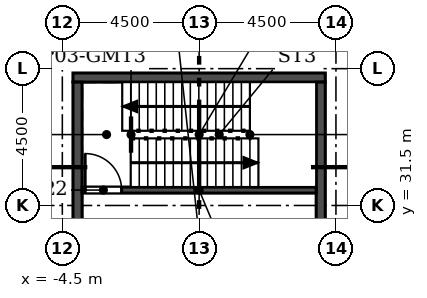
"""IFC4 building model, lengths in metres.
Left out: names, types, materials, properties, quantities, classifications, styles, units other than length and angle.
Written with IfcOpenShell. Run it as: python <this file> out.ifc"""

import sys

from ifc_helpers import new_model, si_unit, direction, frame, frame_2d, origin, place, context, subcontext, project, spatial, rectangle, extrude, element, fill, save


model = new_model("IFC4")
c1 = context("Model", 3, precision=1e-05, world=origin(), true_north=direction((0.0, 1.0)))
c2 = subcontext(c1, "Body", "Model", "MODEL_VIEW")
j1 = project(units=[si_unit("LENGTHUNIT", "METRE"), si_unit("PLANEANGLEUNIT", "RADIAN")], contexts=[c1])
p1 = place(None, origin())
s1 = spatial("IfcSite", under=j1, at=p1, CompositionType="ELEMENT")
p2 = place(p1, origin())
s2 = spatial("IfcBuilding", under=s1, at=p2, CompositionType="ELEMENT")
p3 = place(p2, frame((0.0, 0.0, 20.0)))
s3 = spatial("IfcBuildingStorey", under=s2, at=p3, CompositionType="ELEMENT", Elevation=20.0)
p4 = place(p3, frame((42.853, 8.575, 0.0), z_axis=(0.0, 0.0, 1.0), x_axis=(-0.49999894854, 0.866026010844, 0.0)))
e1 = element("IfcWall", 1, at=p4, inside=s3, PredefinedType="SOLIDWALL", context=c2, shape_type="SweptSolid", body=[
    extrude(rectangle(XDim=76.0, YDim=0.34, at=frame_2d((38.0, 0.0))), origin(), (0.0, 0.0, 1.0), 3.0),
])
p5 = place(p4, frame((1.058, 0.0, 0.9)))
e2 = element("IfcOpeningElement", 2, at=p5, cuts=e1, PredefinedType="OPENING", context=c2, shape_type="SweptSolid", body=[
    extrude(rectangle(XDim=1.885, YDim=1.9, at=frame_2d((0.942, 0.95))), frame((0.0, 0.18, 0.0), z_axis=(0.0, -1.0, 0.0), x_axis=(1.0, 0.0, 0.0)), (0.0, 0.0, 1.0), 0.36),
])
p6 = place(p4, frame((4.058, 0.0, 0.9)))
e3 = element("IfcOpeningElement", 3, at=p6, cuts=e1, PredefinedType="OPENING", context=c2, shape_type="SweptSolid", body=[
    extrude(rectangle(XDim=1.885, YDim=1.9, at=frame_2d((0.942, 0.95))), frame((0.0, 0.18, 0.0), z_axis=(0.0, -1.0, 0.0), x_axis=(1.0, 0.0, 0.0)), (0.0, 0.0, 1.0), 0.36),
])
p7 = place(p4, frame((7.058, 0.0, 0.9)))
e4 = element("IfcOpeningElement", 4, at=p7, cuts=e1, PredefinedType="OPENING", context=c2, shape_type="SweptSolid", body=[
    extrude(rectangle(XDim=1.885, YDim=1.9, at=frame_2d((0.942, 0.95))), frame((0.0, 0.18, 0.0), z_axis=(0.0, -1.0, 0.0), x_axis=(1.0, 0.0, 0.0)), (0.0, 0.0, 1.0), 0.36),
])
p8 = place(p4, frame((10.058, 0.0, 0.9)))
e5 = element("IfcOpeningElement", 5, at=p8, cuts=e1, PredefinedType="OPENING", context=c2, shape_type="SweptSolid", body=[
    extrude(rectangle(XDim=1.885, YDim=1.9, at=frame_2d((0.942, 0.95))), frame((0.0, 0.18, 0.0), z_axis=(0.0, -1.0, 0.0), x_axis=(1.0, 0.0, 0.0)), (0.0, 0.0, 1.0), 0.36),
])
p9 = place(p4, frame((13.058, 0.0, 0.9)))
e6 = element("IfcOpeningElement", 6, at=p9, cuts=e1, PredefinedType="OPENING", context=c2, shape_type="SweptSolid", body=[
    extrude(rectangle(XDim=1.885, YDim=1.9, at=frame_2d((0.942, 0.95))), frame((0.0, 0.18, 0.0), z_axis=(0.0, -1.0, 0.0), x_axis=(1.0, 0.0, 0.0)), (0.0, 0.0, 1.0), 0.36),
])
p10 = place(p4, frame((16.058, 0.0, 0.9)))
e7 = element("IfcOpeningElement", 7, at=p10, cuts=e1, PredefinedType="OPENING", context=c2, shape_type="SweptSolid", body=[
    extrude(rectangle(XDim=1.885, YDim=1.9, at=frame_2d((0.942, 0.95))), frame((0.0, 0.18, 0.0), z_axis=(0.0, -1.0, 0.0), x_axis=(1.0, 0.0, 0.0)), (0.0, 0.0, 1.0), 0.36),
])
p11 = place(p4, frame((19.058, 0.0, 0.9)))
e8 = element("IfcOpeningElement", 8, at=p11, cuts=e1, PredefinedType="OPENING", context=c2, shape_type="SweptSolid", body=[
    extrude(rectangle(XDim=1.885, YDim=1.9, at=frame_2d((0.942, 0.95))), frame((0.0, 0.18, 0.0), z_axis=(0.0, -1.0, 0.0), x_axis=(1.0, 0.0, 0.0)), (0.0, 0.0, 1.0), 0.36),
])
p12 = place(p4, frame((22.058, 0.0, 0.9)))
e9 = element("IfcOpeningElement", 9, at=p12, cuts=e1, PredefinedType="OPENING", context=c2, shape_type="SweptSolid", body=[
    extrude(rectangle(XDim=1.885, YDim=1.9, at=frame_2d((0.942, 0.95))), frame((0.0, 0.18, 0.0), z_axis=(0.0, -1.0, 0.0), x_axis=(1.0, 0.0, 0.0)), (0.0, 0.0, 1.0), 0.36),
])
p13 = place(p4, frame((25.058, 0.0, 0.9)))
e10 = element("IfcOpeningElement", 10, at=p13, cuts=e1, PredefinedType="OPENING", context=c2, shape_type="SweptSolid", body=[
    extrude(rectangle(XDim=1.885, YDim=1.9, at=frame_2d((0.942, 0.95))), frame((0.0, 0.18, 0.0), z_axis=(0.0, -1.0, 0.0), x_axis=(1.0, 0.0, 0.0)), (0.0, 0.0, 1.0), 0.36),
])
p14 = place(p4, frame((28.058, 0.0, 0.9)))
e11 = element("IfcOpeningElement", 11, at=p14, cuts=e1, PredefinedType="OPENING", context=c2, shape_type="SweptSolid", body=[
    extrude(rectangle(XDim=1.885, YDim=1.9, at=frame_2d((0.942, 0.95))), frame((0.0, 0.18, 0.0), z_axis=(0.0, -1.0, 0.0), x_axis=(1.0, 0.0, 0.0)), (0.0, 0.0, 1.0), 0.36),
])
p15 = place(p4, frame((31.058, 0.0, 0.9)))
e12 = element("IfcOpeningElement", 12, at=p15, cuts=e1, PredefinedType="OPENING", context=c2, shape_type="SweptSolid", body=[
    extrude(rectangle(XDim=1.885, YDim=1.9, at=frame_2d((0.942, 0.95))), frame((0.0, 0.18, 0.0), z_axis=(0.0, -1.0, 0.0), x_axis=(1.0, 0.0, 0.0)), (0.0, 0.0, 1.0), 0.36),
])
p16 = place(p4, frame((34.058, 0.0, 0.9)))
e13 = element("IfcOpeningElement", 13, at=p16, cuts=e1, PredefinedType="OPENING", context=c2, shape_type="SweptSolid", body=[
    extrude(rectangle(XDim=1.885, YDim=1.9, at=frame_2d((0.942, 0.95))), frame((0.0, 0.18, 0.0), z_axis=(0.0, -1.0, 0.0), x_axis=(1.0, 0.0, 0.0)), (0.0, 0.0, 1.0), 0.36),
])
p17 = place(p4, frame((37.058, 0.0, 0.9)))
e14 = element("IfcOpeningElement", 14, at=p17, cuts=e1, PredefinedType="OPENING", context=c2, shape_type="SweptSolid", body=[
    extrude(rectangle(XDim=1.885, YDim=1.9, at=frame_2d((0.942, 0.95))), frame((0.0, 0.18, 0.0), z_axis=(0.0, -1.0, 0.0), x_axis=(1.0, 0.0, 0.0)), (0.0, 0.0, 1.0), 0.36),
])
p18 = place(p4, frame((40.058, 0.0, 0.9)))
e15 = element("IfcOpeningElement", 15, at=p18, cuts=e1, PredefinedType="OPENING", context=c2, shape_type="SweptSolid", body=[
    extrude(rectangle(XDim=1.885, YDim=1.9, at=frame_2d((0.942, 0.95))), frame((0.0, 0.18, 0.0), z_axis=(0.0, -1.0, 0.0), x_axis=(1.0, 0.0, 0.0)), (0.0, 0.0, 1.0), 0.36),
])
p19 = place(p4, frame((43.058, 0.0, 0.9)))
e16 = element("IfcOpeningElement", 16, at=p19, cuts=e1, PredefinedType="OPENING", context=c2, shape_type="SweptSolid", body=[
    extrude(rectangle(XDim=1.885, YDim=1.9, at=frame_2d((0.942, 0.95))), frame((0.0, 0.18, 0.0), z_axis=(0.0, -1.0, 0.0), x_axis=(1.0, 0.0, 0.0)), (0.0, 0.0, 1.0), 0.36),
])
p20 = place(p4, frame((46.058, 0.0, 0.9)))
e17 = element("IfcOpeningElement", 17, at=p20, cuts=e1, PredefinedType="OPENING", context=c2, shape_type="SweptSolid", body=[
    extrude(rectangle(XDim=1.885, YDim=1.9, at=frame_2d((0.942, 0.95))), frame((0.0, 0.18, 0.0), z_axis=(0.0, -1.0, 0.0), x_axis=(1.0, 0.0, 0.0)), (0.0, 0.0, 1.0), 0.36),
])
p21 = place(p4, frame((49.058, 0.0, 0.9)))
e18 = element("IfcOpeningElement", 18, at=p21, cuts=e1, PredefinedType="OPENING", context=c2, shape_type="SweptSolid", body=[
    extrude(rectangle(XDim=1.885, YDim=1.9, at=frame_2d((0.942, 0.95))), frame((0.0, 0.18, 0.0), z_axis=(0.0, -1.0, 0.0), x_axis=(1.0, 0.0, 0.0)), (0.0, 0.0, 1.0), 0.36),
])
p22 = place(p4, frame((52.058, 0.0, 0.9)))
e19 = element("IfcOpeningElement", 19, at=p22, cuts=e1, PredefinedType="OPENING", context=c2, shape_type="SweptSolid", body=[
    extrude(rectangle(XDim=1.885, YDim=1.9, at=frame_2d((0.942, 0.95))), frame((0.0, 0.18, 0.0), z_axis=(0.0, -1.0, 0.0), x_axis=(1.0, 0.0, 0.0)), (0.0, 0.0, 1.0), 0.36),
])
p23 = place(p4, frame((55.058, 0.0, 0.9)))
e20 = element("IfcOpeningElement", 20, at=p23, cuts=e1, PredefinedType="OPENING", context=c2, shape_type="SweptSolid", body=[
    extrude(rectangle(XDim=1.885, YDim=1.9, at=frame_2d((0.942, 0.95))), frame((0.0, 0.18, 0.0), z_axis=(0.0, -1.0, 0.0), x_axis=(1.0, 0.0, 0.0)), (0.0, 0.0, 1.0), 0.36),
])
p24 = place(p4, frame((58.058, 0.0, 0.9)))
e21 = element("IfcOpeningElement", 21, at=p24, cuts=e1, PredefinedType="OPENING", context=c2, shape_type="SweptSolid", body=[
    extrude(rectangle(XDim=1.885, YDim=1.9, at=frame_2d((0.942, 0.95))), frame((0.0, 0.18, 0.0), z_axis=(0.0, -1.0, 0.0), x_axis=(1.0, 0.0, 0.0)), (0.0, 0.0, 1.0), 0.36),
])
p25 = place(p4, frame((61.058, 0.0, 0.9)))
e22 = element("IfcOpeningElement", 22, at=p25, cuts=e1, PredefinedType="OPENING", context=c2, shape_type="SweptSolid", body=[
    extrude(rectangle(XDim=1.885, YDim=1.9, at=frame_2d((0.942, 0.95))), frame((0.0, 0.18, 0.0), z_axis=(0.0, -1.0, 0.0), x_axis=(1.0, 0.0, 0.0)), (0.0, 0.0, 1.0), 0.36),
])
p26 = place(p4, frame((64.058, 0.0, 0.9)))
e23 = element("IfcOpeningElement", 23, at=p26, cuts=e1, PredefinedType="OPENING", context=c2, shape_type="SweptSolid", body=[
    extrude(rectangle(XDim=1.885, YDim=1.9, at=frame_2d((0.942, 0.95))), frame((0.0, 0.18, 0.0), z_axis=(0.0, -1.0, 0.0), x_axis=(1.0, 0.0, 0.0)), (0.0, 0.0, 1.0), 0.36),
])
p27 = place(p4, frame((67.058, 0.0, 0.9)))
e24 = element("IfcOpeningElement", 24, at=p27, cuts=e1, PredefinedType="OPENING", context=c2, shape_type="SweptSolid", body=[
    extrude(rectangle(XDim=1.885, YDim=1.9, at=frame_2d((0.942, 0.95))), frame((0.0, 0.18, 0.0), z_axis=(0.0, -1.0, 0.0), x_axis=(1.0, 0.0, 0.0)), (0.0, 0.0, 1.0), 0.36),
])
p28 = place(p4, frame((70.058, 0.0, 0.9)))
e25 = element("IfcOpeningElement", 25, at=p28, cuts=e1, PredefinedType="OPENING", context=c2, shape_type="SweptSolid", body=[
    extrude(rectangle(XDim=1.885, YDim=1.9, at=frame_2d((0.942, 0.95))), frame((0.0, 0.18, 0.0), z_axis=(0.0, -1.0, 0.0), x_axis=(1.0, 0.0, 0.0)), (0.0, 0.0, 1.0), 0.36),
])
p29 = place(p4, frame((73.058, 0.0, 0.9)))
e26 = element("IfcOpeningElement", 26, at=p29, cuts=e1, PredefinedType="OPENING", context=c2, shape_type="SweptSolid", body=[
    extrude(rectangle(XDim=1.885, YDim=1.9, at=frame_2d((0.942, 0.95))), frame((0.0, 0.18, 0.0), z_axis=(0.0, -1.0, 0.0), x_axis=(1.0, 0.0, 0.0)), (0.0, 0.0, 1.0), 0.36),
])
p30 = place(p3, frame((-4.853, 74.393, 0.0), z_axis=(0.0, 0.0, 1.0), x_axis=(-0.49999894854, -0.866026010844, 0.0)))
e27 = element("IfcWall", 27, at=p30, inside=s3, PredefinedType="SOLIDWALL", context=c2, shape_type="SweptSolid", body=[
    extrude(rectangle(XDim=76.0, YDim=0.34, at=frame_2d((38.0, 0.0))), origin(), (0.0, 0.0, 1.0), 3.0),
])
p31 = place(p30, frame((1.058, 0.0, 0.9)))
e28 = element("IfcOpeningElement", 28, at=p31, cuts=e27, PredefinedType="OPENING", context=c2, shape_type="SweptSolid", body=[
    extrude(rectangle(XDim=1.885, YDim=1.9, at=frame_2d((0.942, 0.95))), frame((0.0, 0.18, 0.0), z_axis=(0.0, -1.0, 0.0), x_axis=(1.0, 0.0, 0.0)), (0.0, 0.0, 1.0), 0.36),
])
p32 = place(p30, frame((4.058, 0.0, 0.9)))
e29 = element("IfcOpeningElement", 29, at=p32, cuts=e27, PredefinedType="OPENING", context=c2, shape_type="SweptSolid", body=[
    extrude(rectangle(XDim=1.885, YDim=1.9, at=frame_2d((0.942, 0.95))), frame((0.0, 0.18, 0.0), z_axis=(0.0, -1.0, 0.0), x_axis=(1.0, 0.0, 0.0)), (0.0, 0.0, 1.0), 0.36),
])
p33 = place(p30, frame((7.058, 0.0, 0.9)))
e30 = element("IfcOpeningElement", 30, at=p33, cuts=e27, PredefinedType="OPENING", context=c2, shape_type="SweptSolid", body=[
    extrude(rectangle(XDim=1.885, YDim=1.9, at=frame_2d((0.942, 0.95))), frame((0.0, 0.18, 0.0), z_axis=(0.0, -1.0, 0.0), x_axis=(1.0, 0.0, 0.0)), (0.0, 0.0, 1.0), 0.36),
])
p34 = place(p30, frame((10.058, 0.0, 0.9)))
e31 = element("IfcOpeningElement", 31, at=p34, cuts=e27, PredefinedType="OPENING", context=c2, shape_type="SweptSolid", body=[
    extrude(rectangle(XDim=1.885, YDim=1.9, at=frame_2d((0.942, 0.95))), frame((0.0, 0.18, 0.0), z_axis=(0.0, -1.0, 0.0), x_axis=(1.0, 0.0, 0.0)), (0.0, 0.0, 1.0), 0.36),
])
p35 = place(p30, frame((13.058, 0.0, 0.9)))
e32 = element("IfcOpeningElement", 32, at=p35, cuts=e27, PredefinedType="OPENING", context=c2, shape_type="SweptSolid", body=[
    extrude(rectangle(XDim=1.885, YDim=1.9, at=frame_2d((0.942, 0.95))), frame((0.0, 0.18, 0.0), z_axis=(0.0, -1.0, 0.0), x_axis=(1.0, 0.0, 0.0)), (0.0, 0.0, 1.0), 0.36),
])
p36 = place(p30, frame((16.058, 0.0, 0.9)))
e33 = element("IfcOpeningElement", 33, at=p36, cuts=e27, PredefinedType="OPENING", context=c2, shape_type="SweptSolid", body=[
    extrude(rectangle(XDim=1.885, YDim=1.9, at=frame_2d((0.942, 0.95))), frame((0.0, 0.18, 0.0), z_axis=(0.0, -1.0, 0.0), x_axis=(1.0, 0.0, 0.0)), (0.0, 0.0, 1.0), 0.36),
])
p37 = place(p30, frame((19.058, 0.0, 0.9)))
e34 = element("IfcOpeningElement", 34, at=p37, cuts=e27, PredefinedType="OPENING", context=c2, shape_type="SweptSolid", body=[
    extrude(rectangle(XDim=1.885, YDim=1.9, at=frame_2d((0.942, 0.95))), frame((0.0, 0.18, 0.0), z_axis=(0.0, -1.0, 0.0), x_axis=(1.0, 0.0, 0.0)), (0.0, 0.0, 1.0), 0.36),
])
p38 = place(p30, frame((22.058, 0.0, 0.9)))
e35 = element("IfcOpeningElement", 35, at=p38, cuts=e27, PredefinedType="OPENING", context=c2, shape_type="SweptSolid", body=[
    extrude(rectangle(XDim=1.885, YDim=1.9, at=frame_2d((0.942, 0.95))), frame((0.0, 0.18, 0.0), z_axis=(0.0, -1.0, 0.0), x_axis=(1.0, 0.0, 0.0)), (0.0, 0.0, 1.0), 0.36),
])
p39 = place(p30, frame((25.058, 0.0, 0.9)))
e36 = element("IfcOpeningElement", 36, at=p39, cuts=e27, PredefinedType="OPENING", context=c2, shape_type="SweptSolid", body=[
    extrude(rectangle(XDim=1.885, YDim=1.9, at=frame_2d((0.942, 0.95))), frame((0.0, 0.18, 0.0), z_axis=(0.0, -1.0, 0.0), x_axis=(1.0, 0.0, 0.0)), (0.0, 0.0, 1.0), 0.36),
])
p40 = place(p30, frame((28.058, 0.0, 0.9)))
e37 = element("IfcOpeningElement", 37, at=p40, cuts=e27, PredefinedType="OPENING", context=c2, shape_type="SweptSolid", body=[
    extrude(rectangle(XDim=1.885, YDim=1.9, at=frame_2d((0.942, 0.95))), frame((0.0, 0.18, 0.0), z_axis=(0.0, -1.0, 0.0), x_axis=(1.0, 0.0, 0.0)), (0.0, 0.0, 1.0), 0.36),
])
p41 = place(p30, frame((31.058, 0.0, 0.9)))
e38 = element("IfcOpeningElement", 38, at=p41, cuts=e27, PredefinedType="OPENING", context=c2, shape_type="SweptSolid", body=[
    extrude(rectangle(XDim=1.885, YDim=1.9, at=frame_2d((0.942, 0.95))), frame((0.0, 0.18, 0.0), z_axis=(0.0, -1.0, 0.0), x_axis=(1.0, 0.0, 0.0)), (0.0, 0.0, 1.0), 0.36),
])
p42 = place(p30, frame((34.058, 0.0, 0.9)))
e39 = element("IfcOpeningElement", 39, at=p42, cuts=e27, PredefinedType="OPENING", context=c2, shape_type="SweptSolid", body=[
    extrude(rectangle(XDim=1.885, YDim=1.9, at=frame_2d((0.942, 0.95))), frame((0.0, 0.18, 0.0), z_axis=(0.0, -1.0, 0.0), x_axis=(1.0, 0.0, 0.0)), (0.0, 0.0, 1.0), 0.36),
])
p43 = place(p30, frame((37.058, 0.0, 0.9)))
e40 = element("IfcOpeningElement", 40, at=p43, cuts=e27, PredefinedType="OPENING", context=c2, shape_type="SweptSolid", body=[
    extrude(rectangle(XDim=1.885, YDim=1.9, at=frame_2d((0.942, 0.95))), frame((0.0, 0.18, 0.0), z_axis=(0.0, -1.0, 0.0), x_axis=(1.0, 0.0, 0.0)), (0.0, 0.0, 1.0), 0.36),
])
p44 = place(p30, frame((40.058, 0.0, 0.9)))
e41 = element("IfcOpeningElement", 41, at=p44, cuts=e27, PredefinedType="OPENING", context=c2, shape_type="SweptSolid", body=[
    extrude(rectangle(XDim=1.885, YDim=1.9, at=frame_2d((0.942, 0.95))), frame((0.0, 0.18, 0.0), z_axis=(0.0, -1.0, 0.0), x_axis=(1.0, 0.0, 0.0)), (0.0, 0.0, 1.0), 0.36),
])
p45 = place(p30, frame((43.058, 0.0, 0.9)))
e42 = element("IfcOpeningElement", 42, at=p45, cuts=e27, PredefinedType="OPENING", context=c2, shape_type="SweptSolid", body=[
    extrude(rectangle(XDim=1.885, YDim=1.9, at=frame_2d((0.942, 0.95))), frame((0.0, 0.18, 0.0), z_axis=(0.0, -1.0, 0.0), x_axis=(1.0, 0.0, 0.0)), (0.0, 0.0, 1.0), 0.36),
])
p46 = place(p30, frame((46.058, 0.0, 0.9)))
e43 = element("IfcOpeningElement", 43, at=p46, cuts=e27, PredefinedType="OPENING", context=c2, shape_type="SweptSolid", body=[
    extrude(rectangle(XDim=1.885, YDim=1.9, at=frame_2d((0.942, 0.95))), frame((0.0, 0.18, 0.0), z_axis=(0.0, -1.0, 0.0), x_axis=(1.0, 0.0, 0.0)), (0.0, 0.0, 1.0), 0.36),
])
p47 = place(p30, frame((49.058, 0.0, 0.9)))
e44 = element("IfcOpeningElement", 44, at=p47, cuts=e27, PredefinedType="OPENING", context=c2, shape_type="SweptSolid", body=[
    extrude(rectangle(XDim=1.885, YDim=1.9, at=frame_2d((0.942, 0.95))), frame((0.0, 0.18, 0.0), z_axis=(0.0, -1.0, 0.0), x_axis=(1.0, 0.0, 0.0)), (0.0, 0.0, 1.0), 0.36),
])
p48 = place(p30, frame((52.058, 0.0, 0.9)))
e45 = element("IfcOpeningElement", 45, at=p48, cuts=e27, PredefinedType="OPENING", context=c2, shape_type="SweptSolid", body=[
    extrude(rectangle(XDim=1.885, YDim=1.9, at=frame_2d((0.942, 0.95))), frame((0.0, 0.18, 0.0), z_axis=(0.0, -1.0, 0.0), x_axis=(1.0, 0.0, 0.0)), (0.0, 0.0, 1.0), 0.36),
])
p49 = place(p30, frame((55.058, 0.0, 0.9)))
e46 = element("IfcOpeningElement", 46, at=p49, cuts=e27, PredefinedType="OPENING", context=c2, shape_type="SweptSolid", body=[
    extrude(rectangle(XDim=1.885, YDim=1.9, at=frame_2d((0.942, 0.95))), frame((0.0, 0.18, 0.0), z_axis=(0.0, -1.0, 0.0), x_axis=(1.0, 0.0, 0.0)), (0.0, 0.0, 1.0), 0.36),
])
p50 = place(p30, frame((58.058, 0.0, 0.9)))
e47 = element("IfcOpeningElement", 47, at=p50, cuts=e27, PredefinedType="OPENING", context=c2, shape_type="SweptSolid", body=[
    extrude(rectangle(XDim=1.885, YDim=1.9, at=frame_2d((0.942, 0.95))), frame((0.0, 0.18, 0.0), z_axis=(0.0, -1.0, 0.0), x_axis=(1.0, 0.0, 0.0)), (0.0, 0.0, 1.0), 0.36),
])
p51 = place(p30, frame((61.058, 0.0, 0.9)))
e48 = element("IfcOpeningElement", 48, at=p51, cuts=e27, PredefinedType="OPENING", context=c2, shape_type="SweptSolid", body=[
    extrude(rectangle(XDim=1.885, YDim=1.9, at=frame_2d((0.942, 0.95))), frame((0.0, 0.18, 0.0), z_axis=(0.0, -1.0, 0.0), x_axis=(1.0, 0.0, 0.0)), (0.0, 0.0, 1.0), 0.36),
])
p52 = place(p30, frame((64.058, 0.0, 0.9)))
e49 = element("IfcOpeningElement", 49, at=p52, cuts=e27, PredefinedType="OPENING", context=c2, shape_type="SweptSolid", body=[
    extrude(rectangle(XDim=1.885, YDim=1.9, at=frame_2d((0.942, 0.95))), frame((0.0, 0.18, 0.0), z_axis=(0.0, -1.0, 0.0), x_axis=(1.0, 0.0, 0.0)), (0.0, 0.0, 1.0), 0.36),
])
p53 = place(p30, frame((67.058, 0.0, 0.9)))
e50 = element("IfcOpeningElement", 50, at=p53, cuts=e27, PredefinedType="OPENING", context=c2, shape_type="SweptSolid", body=[
    extrude(rectangle(XDim=1.885, YDim=1.9, at=frame_2d((0.942, 0.95))), frame((0.0, 0.18, 0.0), z_axis=(0.0, -1.0, 0.0), x_axis=(1.0, 0.0, 0.0)), (0.0, 0.0, 1.0), 0.36),
])
p54 = place(p30, frame((70.058, 0.0, 0.9)))
e51 = element("IfcOpeningElement", 51, at=p54, cuts=e27, PredefinedType="OPENING", context=c2, shape_type="SweptSolid", body=[
    extrude(rectangle(XDim=1.885, YDim=1.9, at=frame_2d((0.942, 0.95))), frame((0.0, 0.18, 0.0), z_axis=(0.0, -1.0, 0.0), x_axis=(1.0, 0.0, 0.0)), (0.0, 0.0, 1.0), 0.36),
])
p55 = place(p30, frame((73.058, 0.0, 0.9)))
e52 = element("IfcOpeningElement", 52, at=p55, cuts=e27, PredefinedType="OPENING", context=c2, shape_type="SweptSolid", body=[
    extrude(rectangle(XDim=1.885, YDim=1.9, at=frame_2d((0.942, 0.95))), frame((0.0, 0.18, 0.0), z_axis=(0.0, -1.0, 0.0), x_axis=(1.0, 0.0, 0.0)), (0.0, 0.0, 1.0), 0.36),
])
p56 = place(p3, frame((-4.15, 35.707, -0.3), z_axis=(0.0, 0.0, 1.0), x_axis=(1.0, 0.0, 0.0)))
e53 = element("IfcWall", 53, at=p56, inside=s3, PredefinedType="SOLIDWALL", context=c2, shape_type="SweptSolid", body=[
    extrude(rectangle(XDim=8.3, YDim=0.3, at=frame_2d((4.15, 0.0))), origin(), (0.0, 0.0, 1.0), 3.3),
])
for number, where, z_axis, x_axis in (
    (54, (-4.0, 29.057, -0.3), (0.0, 0.0, 1.0), (0.0, 1.0, 0.0)),
    (55, (4.0, 29.057, -0.3), (0.0, 0.0, 1.0), (0.0, 1.0, 0.0)),
):
    element("IfcWall", number, at=place(p3, frame(where, z_axis=z_axis, x_axis=x_axis)), inside=s3, PredefinedType="SOLIDWALL", context=c2, shape_type="SweptSolid", body=[
        extrude(rectangle(XDim=6.5, YDim=0.3, at=frame_2d((3.25, 0.0))), origin(), (0.0, 0.0, 1.0), 3.3),
    ])
p57 = place(p3, frame((-3.85, 32.007, -0.3), z_axis=(0.0, 0.0, 1.0), x_axis=(1.0, 0.0, 0.0)))
e56 = element("IfcWall", 56, at=p57, inside=s3, PredefinedType="SOLIDWALL", context=c2, shape_type="SweptSolid", body=[
    extrude(rectangle(XDim=7.7, YDim=0.2, at=frame_2d((3.85, 0.0))), origin(), (0.0, 0.0, 1.0), 3.3),
])
p58 = place(p57, frame((0.1, 0.0, 0.3)))
e57 = element("IfcOpeningElement", 57, at=p58, cuts=e56, PredefinedType="OPENING", context=c2, shape_type="SweptSolid", body=[
    extrude(rectangle(XDim=1.2, YDim=2.1, at=frame_2d((0.6, 1.05))), frame((0.0, 0.11, 0.0), z_axis=(0.0, -1.0, 0.0), x_axis=(1.0, 0.0, 0.0)), (0.0, 0.0, 1.0), 0.22),
])
p59 = place(p58, origin())
e58 = element("IfcDoor", 58, at=p59, inside=s3, OperationType="SINGLE_SWING_LEFT", PredefinedType="DOOR", context=c2, shape_type="SweptSolid", body=[
    extrude(rectangle(XDim=1.2, YDim=2.1, at=frame_2d((0.6, 1.05))), frame((0.0, 0.025, 0.0), z_axis=(0.0, -1.0, 0.0), x_axis=(1.0, 0.0, 0.0)), (0.0, 0.0, 1.0), 0.05),
])
fill(e57, e58)
save(model, sys.argv[1])
